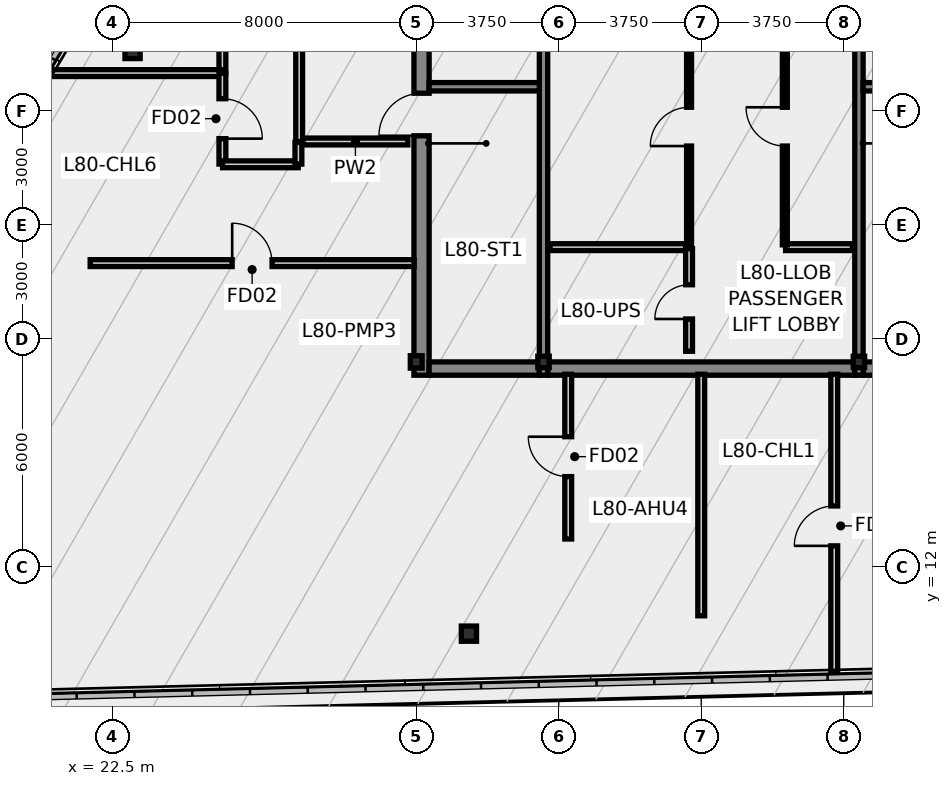
"""IFC4 building model, lengths in metres.
Left out: names, types, materials, properties, quantities, classifications, styles, units other than length and angle.
Written with IfcOpenShell. Run it as: python <this file> out.ifc"""

import sys

from ifc_helpers import new_model, si_unit, direction, frame, frame_2d, origin, origin_2d, place, context, subcontext, project, spatial, rectangle, hollow_rectangle, i_section, extrude, source, transform, mapped, element, fill, save


model = new_model("IFC4")
c1 = context("Model", 3, precision=1e-05, world=origin(), true_north=direction((0.0, 1.0)))
c2 = subcontext(c1, "Body", "Model", "MODEL_VIEW")
j1 = project(units=[si_unit("LENGTHUNIT", "METRE"), si_unit("PLANEANGLEUNIT", "RADIAN")], contexts=[c1])
p1 = place(None, origin())
s1 = spatial("IfcSite", under=j1, at=p1, CompositionType="ELEMENT")
p2 = place(p1, origin())
s2 = spatial("IfcBuilding", under=s1, at=p2, CompositionType="ELEMENT")
p3 = place(p2, frame((0.0, 0.0, 303.4)))
s3 = spatial("IfcBuildingStorey", under=s2, at=p3, CompositionType="ELEMENT", Elevation=303.4)
m1 = source(origin(), c2, "Body", "SweptSolid", [
    extrude(i_section(OverallWidth=0.311, OverallDepth=0.327, WebThickness=0.016, FlangeThickness=0.025, at=origin_2d()), origin(), (0.0, 0.0, 1.0), 6.955),
])
p4 = place(p3, frame((30.5, 17.4, 0.0), z_axis=(0.0, 0.0, 1.0), x_axis=(1.0, 0.0, 0.0)))
e1 = element("IfcColumn", 1, at=p4, inside=s3, PredefinedType="COLUMN", context=c2, shape_type="MappedRepresentation", body=[
    mapped(m1, transform((0.0, 0.0, 0.0), scale=1.0)),
])
m2 = source(origin(), c2, "Body", "SweptSolid", [
    extrude(hollow_rectangle(XDim=0.3, YDim=0.3, WallThickness=0.012, at=origin_2d()), origin(), (0.0, 0.0, 1.0), 7.315),
])
p5 = place(p3, frame((33.85, 17.4, 0.0), z_axis=(0.0, 0.0, 1.0), x_axis=(1.0, 0.0, 0.0)))
e2 = element("IfcColumn", 2, at=p5, inside=s3, PredefinedType="COLUMN", context=c2, shape_type="MappedRepresentation", body=[
    mapped(m2, transform((0.0, 0.0, 0.0), scale=1.0)),
])
m3 = source(origin(), c2, "Body", "SweptSolid", [
    extrude(hollow_rectangle(XDim=0.3, YDim=0.3, WallThickness=0.012, at=origin_2d()), origin(), (0.0, 0.0, 1.0), 8.207),
])
p6 = place(p3, frame((42.15, 17.4, 0.0), z_axis=(0.0, 0.0, 1.0), x_axis=(1.0, 0.0, 0.0)))
e3 = element("IfcColumn", 3, at=p6, inside=s3, PredefinedType="COLUMN", context=c2, shape_type="MappedRepresentation", body=[
    mapped(m3, transform((0.0, 0.0, 0.0), scale=1.0)),
])
p7 = place(p3, frame((30.64, 17.05, 0.0), z_axis=(0.0, 0.0, 1.0), x_axis=(0.0, 1.0, 0.0)))
e4 = element("IfcWall", 4, at=p7, inside=s3, PredefinedType="SHEAR", context=c2, shape_type="SweptSolid", body=[
    extrude(rectangle(XDim=13.125, YDim=0.4, at=frame_2d((6.562, 0.0))), origin(), (0.0, 0.0, 1.0), 6.87),
])
p8 = place(p7, frame((6.3, 0.0, 0.0)))
e5 = element("IfcOpeningElement", 5, at=p8, cuts=e4, PredefinedType="OPENING", context=c2, shape_type="SweptSolid", body=[
    extrude(rectangle(XDim=1.12, YDim=2.15, at=frame_2d((0.56, 1.075))), frame((0.0, 0.212, 0.0), z_axis=(0.0, -1.0, 0.0), x_axis=(1.0, 0.0, 0.0)), (0.0, 0.0, 1.0), 0.424),
])
p9 = place(p7, frame((10.75, 0.0, 0.0)))
e6 = element("IfcOpeningElement", 6, at=p9, cuts=e4, PredefinedType="OPENING", context=c2, shape_type="SweptSolid", body=[
    extrude(rectangle(XDim=1.2, YDim=2.2, at=frame_2d((0.6, 1.1))), frame((0.0, 0.212, 0.0), z_axis=(0.0, -1.0, 0.0), x_axis=(1.0, 0.0, 0.0)), (0.0, 0.0, 1.0), 0.424),
])
p10 = place(p3, frame((30.84, 17.225, 0.0), z_axis=(0.0, 0.0, 1.0), x_axis=(1.0, 0.0, 0.0)))
e7 = element("IfcWall", 7, at=p10, inside=s3, PredefinedType="SHEAR", context=c2, shape_type="SweptSolid", body=[
    extrude(rectangle(XDim=2.9, YDim=0.35, at=frame_2d((1.45, 0.0))), origin(), (0.0, 0.0, 1.0), 6.87),
])
p11 = place(p3, frame((33.96, 17.225, 0.0), z_axis=(0.0, 0.0, 1.0), x_axis=(1.0, 0.0, 0.0)))
e8 = element("IfcWall", 8, at=p11, inside=s3, PredefinedType="SHEAR", context=c2, shape_type="SweptSolid", body=[
    extrude(rectangle(XDim=8.08, YDim=0.35, at=frame_2d((4.04, 0.0))), origin(), (0.0, 0.0, 1.0), 6.87),
])
p12 = place(p3, frame((42.26, 17.225, 0.0), z_axis=(0.0, 0.0, 1.0), x_axis=(1.0, 0.0, 0.0)))
e9 = element("IfcWall", 9, at=p12, inside=s3, PredefinedType="SHEAR", context=c2, shape_type="SweptSolid", body=[
    extrude(rectangle(XDim=2.9, YDim=0.35, at=frame_2d((1.45, 0.0))), origin(), (0.0, 0.0, 1.0), 6.87),
])
for number, where, z_axis, x_axis in (
    (10, (33.85, 17.05, 0.0), (0.0, 0.0, 1.0), (0.0, 1.0, 0.0)),
    (11, (42.15, 17.05, 0.0), (0.0, 0.0, 1.0), (0.0, 1.0, 0.0)),
):
    element("IfcWall", number, at=place(p3, frame(where, z_axis=z_axis, x_axis=x_axis)), inside=s3, PredefinedType="SHEAR", context=c2, shape_type="SweptSolid", body=[
        extrude(rectangle(XDim=13.125, YDim=0.22, at=frame_2d((6.562, 0.0))), origin(), (0.0, 0.0, 1.0), 6.87),
    ])
for number, where, z_axis, x_axis in (
    (12, (30.84, 24.64, 0.0), (0.0, 0.0, 1.0), (1.0, 0.0, 0.0)),
    (13, (42.26, 24.64, 0.0), (0.0, 0.0, 1.0), (1.0, 0.0, 0.0)),
):
    element("IfcWall", number, at=place(p3, frame(where, z_axis=z_axis, x_axis=x_axis)), inside=s3, PredefinedType="SHEAR", context=c2, shape_type="SweptSolid", body=[
        extrude(rectangle(XDim=2.9, YDim=0.22, at=frame_2d((1.45, 0.0))), origin(), (0.0, 0.0, 1.0), 6.87),
    ])
m4 = source(origin(), c2, "Body", "SweptSolid", [
    extrude(hollow_rectangle(XDim=0.4, YDim=0.4, WallThickness=0.016, at=origin_2d()), origin(), (0.0, 0.0, 1.0), 7.676),
])
p13 = place(p3, frame((23.036, 25.581, 0.0), z_axis=(0.0, 0.0, 1.0), x_axis=(1.0, 0.0, 0.0)))
e14 = element("IfcColumn", 14, at=p13, inside=s3, PredefinedType="COLUMN", context=c2, shape_type="MappedRepresentation", body=[
    mapped(m4, transform((0.0, 0.0, 0.0), scale=1.0)),
])
m5 = source(origin(), c2, "Body", "SweptSolid", [
    extrude(hollow_rectangle(XDim=0.4, YDim=0.4, WallThickness=0.016, at=origin_2d()), origin(), (0.0, 0.0, 1.0), 5.773),
])
p14 = place(p3, frame((31.887, 10.25, 0.0), z_axis=(0.0, 0.0, 1.0), x_axis=(1.0, 0.0, 0.0)))
e15 = element("IfcColumn", 15, at=p14, inside=s3, PredefinedType="COLUMN", context=c2, shape_type="MappedRepresentation", body=[
    mapped(m5, transform((0.0, 0.0, 0.0), scale=1.0)),
])
p15 = place(p3, frame((27.42, 23.2, 0.0), z_axis=(0.0, 0.0, 1.0), x_axis=(0.0, 1.0, 0.0)))
e16 = element("IfcWall", 16, at=p15, inside=s3, PredefinedType="PARTITIONING", context=c2, shape_type="SweptSolid", body=[
    extrude(rectangle(XDim=6.4, YDim=0.18, at=frame_2d((3.2, 0.0))), origin(), (0.0, 0.0, 1.0), 3.15),
])
p16 = place(p15, frame((2.65, 0.0, 0.0)))
e17 = element("IfcOpeningElement", 17, at=p16, cuts=e16, PredefinedType="OPENING", context=c2, shape_type="SweptSolid", body=[
    extrude(rectangle(XDim=1.05, YDim=2.15, at=frame_2d((0.525, 1.075))), frame((0.0, 0.102, 0.0), z_axis=(0.0, -1.0, 0.0), x_axis=(1.0, 0.0, 0.0)), (0.0, 0.0, 1.0), 0.204),
])
p17 = place(p3, frame((27.52, 23.2, 0.0), z_axis=(0.0, 0.0, 1.0), x_axis=(1.0, 0.0, 0.0)))
e18 = element("IfcWall", 18, at=p17, inside=s3, PredefinedType="PARTITIONING", context=c2, shape_type="SweptSolid", body=[
    extrude(rectangle(XDim=2.76, YDim=0.18, at=frame_2d((1.38, 0.0))), origin(), (0.0, 0.0, 1.0), 3.15),
])
p18 = place(p3, frame((34.02, 20.42, 0.0), z_axis=(0.0, 0.0, 1.0), x_axis=(1.0, 0.0, 0.0)))
e19 = element("IfcWall", 19, at=p18, inside=s3, PredefinedType="PARTITIONING", context=c2, shape_type="SweptSolid", body=[
    extrude(rectangle(XDim=3.64, YDim=0.18, at=frame_2d((1.82, 0.0))), origin(), (0.0, 0.0, 1.0), 3.15),
])
p19 = place(p3, frame((40.22, 20.42, 0.0), z_axis=(0.0, 0.0, 1.0), x_axis=(1.0, 0.0, 0.0)))
e20 = element("IfcWall", 20, at=p19, inside=s3, PredefinedType="PARTITIONING", context=c2, shape_type="SweptSolid", body=[
    extrude(rectangle(XDim=1.76, YDim=0.18, at=frame_2d((0.88, 0.0))), origin(), (0.0, 0.0, 1.0), 3.15),
])
p20 = place(p3, frame((37.68, 20.48, 0.0), z_axis=(0.0, 0.0, 1.0), x_axis=(0.0, 1.0, 0.0)))
e21 = element("IfcWall", 21, at=p20, inside=s3, PredefinedType="PARTITIONING", context=c2, shape_type="SweptSolid", body=[
    extrude(rectangle(XDim=9.44, YDim=0.13, at=frame_2d((4.72, 0.0))), origin(), (0.0, 0.0, 1.0), 3.15),
])
p21 = place(p20, frame((2.6, 0.0, 0.0)))
e22 = element("IfcOpeningElement", 22, at=p21, cuts=e21, PredefinedType="OPENING", context=c2, shape_type="SweptSolid", body=[
    extrude(rectangle(XDim=1.02, YDim=2.15, at=frame_2d((0.51, 1.075))), frame((0.0, 0.077, 0.0), z_axis=(0.0, -1.0, 0.0), x_axis=(1.0, 0.0, 0.0)), (0.0, 0.0, 1.0), 0.154),
])
p22 = place(p3, frame((40.2, 20.48, 0.0), z_axis=(0.0, 0.0, 1.0), x_axis=(0.0, 1.0, 0.0)))
e23 = element("IfcWall", 23, at=p22, inside=s3, PredefinedType="PARTITIONING", context=c2, shape_type="SweptSolid", body=[
    extrude(rectangle(XDim=9.44, YDim=0.13, at=frame_2d((4.72, 0.0))), origin(), (0.0, 0.0, 1.0), 3.15),
])
p23 = place(p22, frame((2.6, 0.0, 0.0)))
e24 = element("IfcOpeningElement", 24, at=p23, cuts=e23, PredefinedType="OPENING", context=c2, shape_type="SweptSolid", body=[
    extrude(rectangle(XDim=1.02, YDim=2.15, at=frame_2d((0.51, 1.075))), frame((0.0, 0.077, 0.0), z_axis=(0.0, -1.0, 0.0), x_axis=(1.0, 0.0, 0.0)), (0.0, 0.0, 1.0), 0.154),
])
p24 = place(p3, frame((37.68, 17.68, 0.0), z_axis=(0.0, 0.0, 1.0), x_axis=(0.0, 1.0, 0.0)))
e25 = element("IfcWall", 25, at=p24, inside=s3, PredefinedType="PARTITIONING", context=c2, shape_type="SweptSolid", body=[
    extrude(rectangle(XDim=2.7, YDim=0.18, at=frame_2d((1.35, 0.0))), origin(), (0.0, 0.0, 1.0), 3.15),
])
p25 = place(p24, frame((0.85, 0.0, 0.0)))
e26 = element("IfcOpeningElement", 26, at=p25, cuts=e25, PredefinedType="OPENING", context=c2, shape_type="SweptSolid", body=[
    extrude(rectangle(XDim=0.9, YDim=2.1, at=frame_2d((0.45, 1.05))), frame((0.0, 0.102, 0.0), z_axis=(0.0, -1.0, 0.0), x_axis=(1.0, 0.0, 0.0)), (0.0, 0.0, 1.0), 0.204),
])
p26 = place(p3, frame((21.92, 20.0, 0.0), z_axis=(0.0, 0.0, 1.0), x_axis=(1.0, 0.0, 0.0)))
e27 = element("IfcWall", 27, at=p26, inside=s3, PredefinedType="PARTITIONING", context=c2, shape_type="SweptSolid", body=[
    extrude(rectangle(XDim=8.525, YDim=0.18, at=frame_2d((4.263, 0.0))), origin(), (0.0, 0.0, 1.0), 3.15),
])
p27 = place(p26, frame((3.737, 0.0, 0.0)))
e28 = element("IfcOpeningElement", 28, at=p27, cuts=e27, PredefinedType="OPENING", context=c2, shape_type="SweptSolid", body=[
    extrude(rectangle(XDim=1.05, YDim=2.15, at=frame_2d((0.525, 1.075))), frame((0.0, 0.102, 0.0), z_axis=(0.0, -1.0, 0.0), x_axis=(1.0, 0.0, 0.0)), (0.0, 0.0, 1.0), 0.204),
])
p28 = place(p3, frame((41.5, 9.227, 0.0), z_axis=(0.0, 0.0, 1.0), x_axis=(0.0, 1.0, 0.0)))
e29 = element("IfcWall", 29, at=p28, inside=s3, PredefinedType="PARTITIONING", context=c2, shape_type="SweptSolid", body=[
    extrude(rectangle(XDim=7.848, YDim=0.18, at=frame_2d((3.924, 0.0))), origin(), (0.0, 0.0, 1.0), 3.15),
])
p29 = place(p28, frame((3.333, 0.0, 0.0)))
e30 = element("IfcOpeningElement", 30, at=p29, cuts=e29, PredefinedType="OPENING", context=c2, shape_type="SweptSolid", body=[
    extrude(rectangle(XDim=1.05, YDim=2.15, at=frame_2d((0.525, 1.075))), frame((0.0, 0.102, 0.0), z_axis=(0.0, -1.0, 0.0), x_axis=(1.0, 0.0, 0.0)), (0.0, 0.0, 1.0), 0.204),
])
p30 = place(p3, frame((25.4, 25.005, 0.0), z_axis=(0.0, 0.0, 1.0), x_axis=(0.0, 1.0, 0.0)))
e31 = element("IfcWall", 31, at=p30, inside=s3, PredefinedType="PARTITIONING", context=c2, shape_type="SweptSolid", body=[
    extrude(rectangle(XDim=7.681, YDim=0.18, at=frame_2d((3.84, 0.0))), origin(), (0.0, 0.0, 1.0), 3.15),
])
p31 = place(p3, frame((38.0, 10.72, 0.0), z_axis=(0.0, 0.0, 1.0), x_axis=(0.0, 1.0, 0.0)))
e32 = element("IfcWall", 32, at=p31, inside=s3, PredefinedType="PARTITIONING", context=c2, shape_type="SweptSolid", body=[
    extrude(rectangle(XDim=6.355, YDim=0.18, at=frame_2d((3.177, 0.0))), origin(), (0.0, 0.0, 1.0), 3.15),
])
p32 = place(p3, frame((34.5, 12.74, 0.0), z_axis=(0.0, 0.0, 1.0), x_axis=(0.0, 1.0, 0.0)))
e33 = element("IfcWall", 33, at=p32, inside=s3, PredefinedType="PARTITIONING", context=c2, shape_type="SweptSolid", body=[
    extrude(rectangle(XDim=4.335, YDim=0.18, at=frame_2d((2.167, 0.0))), origin(), (0.0, 0.0, 1.0), 3.15),
])
p33 = place(p32, frame((1.642, 0.0, 0.0)))
e34 = element("IfcOpeningElement", 34, at=p33, cuts=e33, PredefinedType="OPENING", context=c2, shape_type="SweptSolid", body=[
    extrude(rectangle(XDim=1.05, YDim=2.15, at=frame_2d((0.525, 1.075))), frame((0.0, 0.102, 0.0), z_axis=(0.0, -1.0, 0.0), x_axis=(1.0, 0.0, 0.0)), (0.0, 0.0, 1.0), 0.204),
])
p34 = place(p3, frame((20.865, 25.0, 0.0), z_axis=(0.0, 0.0, 1.0), x_axis=(1.0, 0.0, 0.0)))
e35 = element("IfcWall", 35, at=p34, inside=s3, PredefinedType="PARTITIONING", context=c2, shape_type="SweptSolid", body=[
    extrude(rectangle(XDim=4.53, YDim=0.18, at=frame_2d((2.265, 0.0))), origin(), (0.0, 0.0, 1.0), 3.15),
])
p35 = place(p3, frame((25.4, 24.995, 0.0), z_axis=(0.0, 0.0, 1.0), x_axis=(0.0, -1.0, 0.0)))
e36 = element("IfcWall", 36, at=p35, inside=s3, PredefinedType="PARTITIONING", context=c2, shape_type="SweptSolid", body=[
    extrude(rectangle(XDim=2.39, YDim=0.18, at=frame_2d((1.195, 0.0))), origin(), (0.0, 0.0, 1.0), 3.15),
])
p36 = place(p35, frame((0.67, 0.0, 0.0)))
e37 = element("IfcOpeningElement", 37, at=p36, cuts=e36, PredefinedType="OPENING", context=c2, shape_type="SweptSolid", body=[
    extrude(rectangle(XDim=1.05, YDim=2.15, at=frame_2d((0.525, 1.075))), frame((0.0, 0.102, 0.0), z_axis=(0.0, -1.0, 0.0), x_axis=(1.0, 0.0, 0.0)), (0.0, 0.0, 1.0), 0.204),
])
p37 = place(p3, frame((25.405, 22.6, 0.0), z_axis=(0.0, 0.0, 1.0), x_axis=(1.0, 0.0, 0.0)))
e38 = element("IfcWall", 38, at=p37, inside=s3, PredefinedType="PARTITIONING", context=c2, shape_type="SweptSolid", body=[
    extrude(rectangle(XDim=1.99, YDim=0.18, at=frame_2d((0.995, 0.0))), origin(), (0.0, 0.0, 1.0), 3.15),
])
p38 = place(p3, frame((27.4, 22.605, 0.0), z_axis=(0.0, 0.0, 1.0), x_axis=(0.0, 1.0, 0.0)))
e39 = element("IfcWall", 39, at=p38, inside=s3, PredefinedType="PARTITIONING", context=c2, shape_type="SweptSolid", body=[
    extrude(rectangle(XDim=0.57, YDim=0.18, at=frame_2d((0.285, 0.0))), origin(), (0.0, 0.0, 1.0), 3.15),
])
p39 = place(p8, origin())
e40 = element("IfcDoor", 40, at=p39, inside=s3, OperationType="SINGLE_SWING_LEFT", PredefinedType="DOOR", context=c2, shape_type="SweptSolid", body=[
    extrude(rectangle(XDim=1.12, YDim=2.15, at=frame_2d((0.56, 1.075))), frame((0.0, 0.025, 0.0), z_axis=(0.0, -1.0, 0.0), x_axis=(1.0, 0.0, 0.0)), (0.0, 0.0, 1.0), 0.05),
])
fill(e5, e40)
p40 = place(p21, origin())
e41 = element("IfcDoor", 41, at=p40, inside=s3, OperationType="SINGLE_SWING_LEFT", PredefinedType="DOOR", context=c2, shape_type="SweptSolid", body=[
    extrude(rectangle(XDim=1.02, YDim=2.15, at=frame_2d((0.51, 1.075))), frame((0.0, 0.025, 0.0), z_axis=(0.0, -1.0, 0.0), x_axis=(1.0, 0.0, 0.0)), (0.0, 0.0, 1.0), 0.05),
])
fill(e22, e41)
p41 = place(p23, origin())
e42 = element("IfcDoor", 42, at=p41, inside=s3, OperationType="SINGLE_SWING_RIGHT", PredefinedType="DOOR", context=c2, shape_type="SweptSolid", body=[
    extrude(rectangle(XDim=1.02, YDim=2.15, at=frame_2d((0.51, 1.075))), frame((0.0, 0.025, 0.0), z_axis=(0.0, -1.0, 0.0), x_axis=(1.0, 0.0, 0.0)), (0.0, 0.0, 1.0), 0.05),
])
fill(e24, e42)
p42 = place(p25, origin())
e43 = element("IfcDoor", 43, at=p42, inside=s3, OperationType="SINGLE_SWING_LEFT", PredefinedType="DOOR", context=c2, shape_type="SweptSolid", body=[
    extrude(rectangle(XDim=0.9, YDim=2.1, at=frame_2d((0.45, 1.05))), frame((0.0, 0.025, 0.0), z_axis=(0.0, -1.0, 0.0), x_axis=(1.0, 0.0, 0.0)), (0.0, 0.0, 1.0), 0.05),
])
fill(e26, e43)
p43 = place(p27, origin())
e44 = element("IfcDoor", 44, at=p43, inside=s3, OperationType="SINGLE_SWING_LEFT", PredefinedType="DOOR", context=c2, shape_type="SweptSolid", body=[
    extrude(rectangle(XDim=1.05, YDim=2.15, at=frame_2d((0.525, 1.075))), frame((0.0, 0.025, 0.0), z_axis=(0.0, -1.0, 0.0), x_axis=(1.0, 0.0, 0.0)), (0.0, 0.0, 1.0), 0.05),
])
fill(e28, e44)
p44 = place(p29, origin())
e45 = element("IfcDoor", 45, at=p44, inside=s3, OperationType="SINGLE_SWING_LEFT", PredefinedType="DOOR", context=c2, shape_type="SweptSolid", body=[
    extrude(rectangle(XDim=1.05, YDim=2.15, at=frame_2d((0.525, 1.075))), frame((0.0, 0.025, 0.0), z_axis=(0.0, -1.0, 0.0), x_axis=(1.0, 0.0, 0.0)), (0.0, 0.0, 1.0), 0.05),
])
fill(e30, e45)
p45 = place(p33, origin())
e46 = element("IfcDoor", 46, at=p45, inside=s3, OperationType="SINGLE_SWING_RIGHT", PredefinedType="DOOR", context=c2, shape_type="SweptSolid", body=[
    extrude(rectangle(XDim=1.05, YDim=2.15, at=frame_2d((0.525, 1.075))), frame((0.0, 0.025, 0.0), z_axis=(0.0, -1.0, 0.0), x_axis=(1.0, 0.0, 0.0)), (0.0, 0.0, 1.0), 0.05),
])
fill(e34, e46)
p46 = place(p36, origin())
e47 = element("IfcDoor", 47, at=p46, inside=s3, OperationType="SINGLE_SWING_RIGHT", PredefinedType="DOOR", context=c2, shape_type="SweptSolid", body=[
    extrude(rectangle(XDim=1.05, YDim=2.15, at=frame_2d((0.525, 1.075))), frame((0.0, 0.025, 0.0), z_axis=(0.0, -1.0, 0.0), x_axis=(1.0, 0.0, 0.0)), (0.0, 0.0, 1.0), 0.05),
])
fill(e37, e47)
save(model, sys.argv[1])
